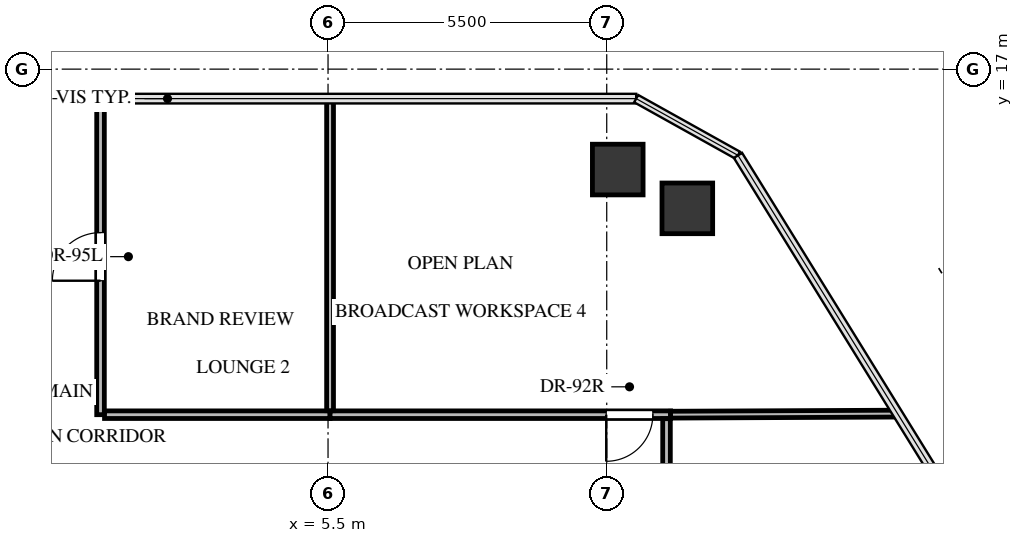
"""IFC4 building model, lengths in metres.
Left out: names, types, materials, properties, quantities, classifications, styles, units other than length and angle.
Written with IfcOpenShell. Run it as: python <this file> out.ifc"""

import sys

from ifc_helpers import new_model, si_unit, direction, frame, frame_2d, origin, origin_2d, place, context, subcontext, project, spatial, rectangle, extrude, source, transform, mapped, element, fill, save


model = new_model("IFC4")
c1 = context("Model", 3, precision=1e-05, world=origin(), true_north=direction((0.0, 1.0)))
c2 = subcontext(c1, "Body", "Model", "MODEL_VIEW")
j1 = project(units=[si_unit("LENGTHUNIT", "METRE"), si_unit("PLANEANGLEUNIT", "RADIAN")], contexts=[c1])
p1 = place(None, origin())
s1 = spatial("IfcSite", under=j1, at=p1, CompositionType="ELEMENT")
p2 = place(p1, origin())
s2 = spatial("IfcBuilding", under=s1, at=p2, CompositionType="ELEMENT")
p3 = place(p2, frame((0.0, 0.0, 196.9)))
s3 = spatial("IfcBuildingStorey", under=s2, at=p3, CompositionType="ELEMENT", Elevation=196.9)
m1 = source(origin(), c2, "Body", "SweptSolid", [
    extrude(rectangle(XDim=1.0, YDim=1.0, at=origin_2d()), origin(), (0.0, 0.0, 1.0), 3.3),
])
for number, where, z_axis, x_axis in (
    (1, (11.218, 15.018, -0.24), (0.0, 0.0, 1.0), (1.0, 0.0, 0.0)),
    (2, (12.591, 14.252, -0.24), (0.0, 0.0, 1.0), (1.0, 0.0, 0.0)),
):
    element("IfcColumn", number, at=place(p3, frame(where, z_axis=z_axis, x_axis=x_axis)), inside=s3, PredefinedType="COLUMN", context=c2, shape_type="MappedRepresentation", body=[
        mapped(m1, transform((0.0, 0.0, 0.0), x_axis=(1.0, 0.0, 0.0), y_axis=(0.0, 1.0, 0.0), z_axis=(0.0, 0.0, 1.0), scale=1.0)),
    ])
p4 = place(p3, frame((1.01, 10.18, 0.0), z_axis=(0.0, 0.0, 1.0), x_axis=(0.0, 1.0, 0.0)))
e3 = element("IfcWall", 3, at=p4, inside=s3, PredefinedType="PARTITIONING", context=c2, shape_type="SweptSolid", body=[
    extrude(rectangle(XDim=6.238, YDim=0.15, at=frame_2d((3.119, 0.0))), origin(), (0.0, 0.0, 1.0), 2.399),
])
p5 = place(p4, frame((2.644, 0.0, 0.0)))
e4 = element("IfcOpeningElement", 4, at=p5, cuts=e3, PredefinedType="OPENING", context=c2, shape_type="SweptSolid", body=[
    extrude(rectangle(XDim=0.95, YDim=2.1, at=frame_2d((0.475, 1.05))), frame((0.0, 0.085, 0.0), z_axis=(0.0, -1.0, 0.0), x_axis=(1.0, 0.0, 0.0)), (0.0, 0.0, 1.0), 0.17),
])
p6 = place(p3, frame((5.54, 10.18, 0.0), z_axis=(0.0, 0.0, 1.0), x_axis=(-1.0, 0.0, 0.0)))
e5 = element("IfcWall", 5, at=p6, inside=s3, PredefinedType="PARTITIONING", context=c2, shape_type="SweptSolid", body=[
    extrude(rectangle(XDim=4.451, YDim=0.15, at=frame_2d((2.226, 0.0))), origin(), (0.0, 0.0, 1.0), 2.608),
])
p7 = place(p3, frame((12.26, 10.18, 0.0), z_axis=(0.0, 0.0, 1.0), x_axis=(-1.0, 0.0, 0.0)))
e6 = element("IfcWall", 6, at=p7, inside=s3, PredefinedType="PARTITIONING", context=c2, shape_type="SweptSolid", body=[
    extrude(rectangle(XDim=6.72, YDim=0.15, at=frame_2d((3.36, 0.0))), origin(), (0.0, 0.0, 1.0), 2.242),
])
p8 = place(p7, frame((0.35, 0.0, 0.0)))
e7 = element("IfcOpeningElement", 7, at=p8, cuts=e6, PredefinedType="OPENING", context=c2, shape_type="SweptSolid", body=[
    extrude(rectangle(XDim=0.92, YDim=2.1, at=frame_2d((0.46, 1.05))), frame((0.0, 0.085, 0.0), z_axis=(0.0, -1.0, 0.0), x_axis=(1.0, 0.0, 0.0)), (0.0, 0.0, 1.0), 0.17),
])
p9 = place(p3, frame((12.18, 2.49, 0.0), z_axis=(0.0, 0.0, 1.0), x_axis=(0.0, 1.0, 0.0)))
e8 = element("IfcWall", 8, at=p9, inside=s3, PredefinedType="PARTITIONING", context=c2, shape_type="SweptSolid", body=[
    extrude(rectangle(XDim=7.611, YDim=0.15, at=frame_2d((3.806, 0.0))), origin(), (0.0, 0.0, 1.0), 3.045),
])
p10 = place(p9, frame((3.345, 0.0, 0.0)))
e9 = element("IfcOpeningElement", 9, at=p10, cuts=e8, PredefinedType="OPENING", context=c2, shape_type="SweptSolid", body=[
    extrude(rectangle(XDim=0.92, YDim=2.1, at=frame_2d((0.46, 1.05))), frame((0.0, 0.085, 0.0), z_axis=(0.0, -1.0, 0.0), x_axis=(1.0, 0.0, 0.0)), (0.0, 0.0, 1.0), 0.17),
])
p11 = place(p3, frame((5.54, 16.418, 0.0), z_axis=(0.0, 0.0, 1.0), x_axis=(0.0, -1.0, 0.0)))
e10 = element("IfcWall", 10, at=p11, inside=s3, PredefinedType="PARTITIONING", context=c2, shape_type="SweptSolid", body=[
    extrude(rectangle(XDim=6.159, YDim=0.135, at=frame_2d((3.08, 0.0))), origin(), (0.0, 0.0, 1.0), 2.399),
])
p12 = place(p3, frame((16.74, 10.201, 0.0), z_axis=(0.0, 0.0, 1.0), x_axis=(-0.999989522694, -0.004577608714, 0.0)))
e11 = element("IfcWall", 11, at=p12, inside=s3, PredefinedType="PARTITIONING", context=c2, shape_type="SweptSolid", body=[
    extrude(rectangle(XDim=4.48, YDim=0.135, at=frame_2d((2.24, 0.0))), origin(), (0.0, 0.0, 1.0), 2.399),
])
m2 = source(origin(), c2, "Body", "SweptSolid", [
    extrude(rectangle(XDim=0.95, YDim=2.1, at=frame_2d((0.475, 1.05))), frame((0.0, 0.025, 0.0), z_axis=(0.0, -1.0, 0.0), x_axis=(1.0, 0.0, 0.0)), (0.0, 0.0, 1.0), 0.05),
])
p13 = place(p5, origin())
e12 = element("IfcDoor", 12, at=p13, inside=s3, OperationType="SINGLE_SWING_LEFT", PredefinedType="DOOR", context=c2, shape_type="MappedRepresentation", body=[
    mapped(m2, transform((0.0, 0.0, 0.0), x_axis=(1.0, 0.0, 0.0), y_axis=(0.0, 1.0, 0.0), z_axis=(0.0, 0.0, 1.0), scale=1.0)),
])
fill(e4, e12)
m3 = source(origin(), c2, "Body", "SweptSolid", [
    extrude(rectangle(XDim=0.92, YDim=2.1, at=frame_2d((0.46, 1.05))), frame((0.0, 0.025, 0.0), z_axis=(0.0, -1.0, 0.0), x_axis=(1.0, 0.0, 0.0)), (0.0, 0.0, 1.0), 0.05),
])
p14 = place(p8, origin())
e13 = element("IfcDoor", 13, at=p14, inside=s3, OperationType="SINGLE_SWING_RIGHT", PredefinedType="DOOR", context=c2, shape_type="MappedRepresentation", body=[
    mapped(m3, transform((0.0, 0.0, 0.0), x_axis=(1.0, 0.0, 0.0), y_axis=(0.0, 1.0, 0.0), z_axis=(0.0, 0.0, 1.0), scale=1.0)),
])
fill(e7, e13)
save(model, sys.argv[1])
